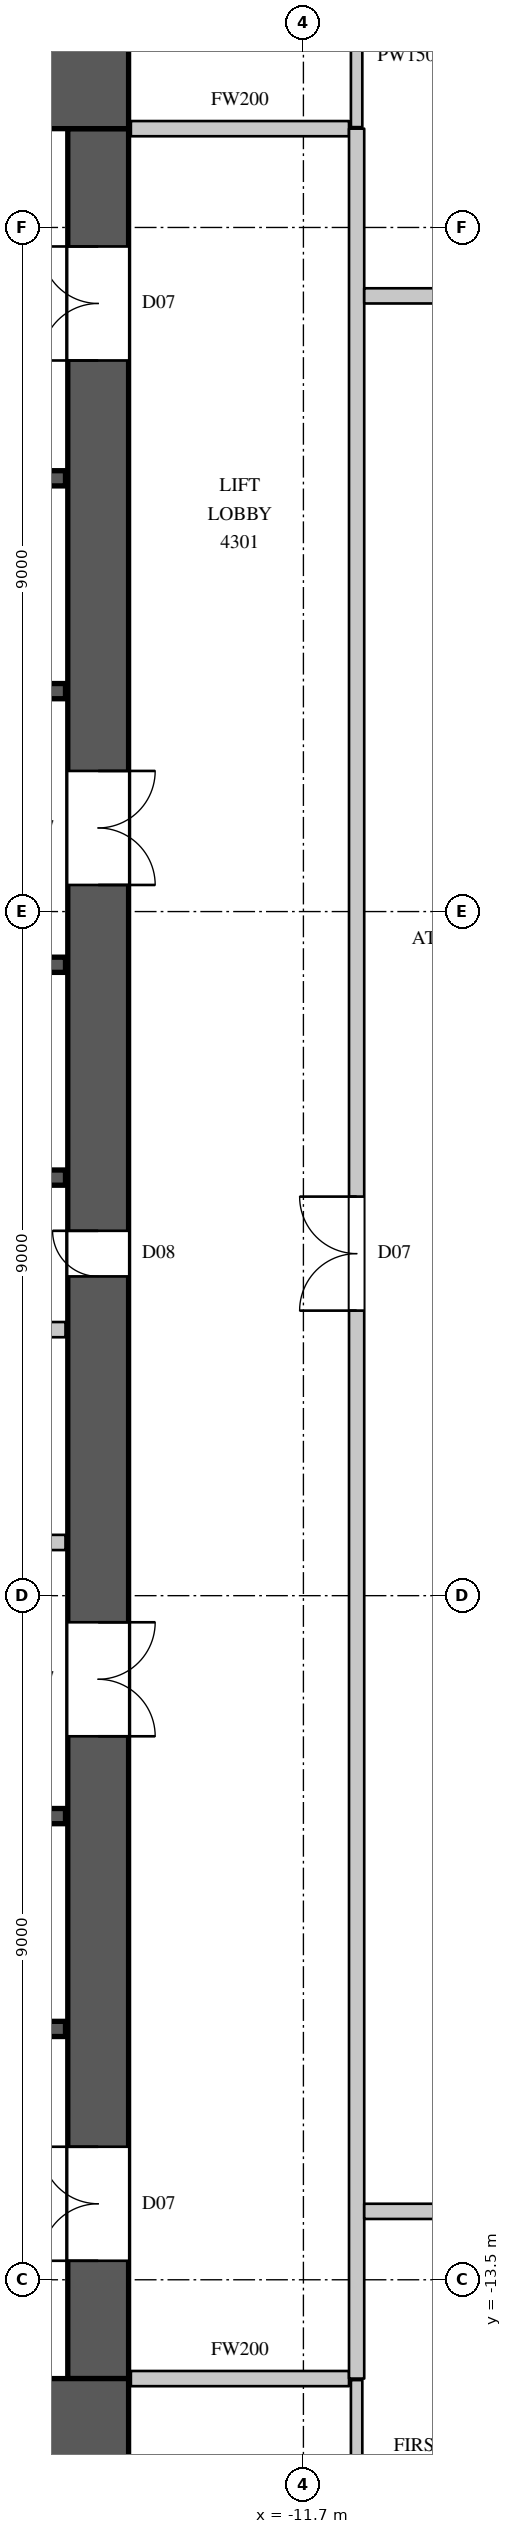
"""IFC4 building model, lengths in metres.
Left out: names, types, materials, properties, quantities, classifications, styles, units other than length and angle.
Written with IfcOpenShell. Run it as: python <this file> out.ifc"""

import sys

from ifc_helpers import new_model, si_unit, direction, frame, frame_2d, origin, place, context, subcontext, project, spatial, rectangle, extrude, element, fill, save


model = new_model("IFC4")
c1 = context("Model", 3, precision=1e-05, world=origin(), true_north=direction((0.0, 1.0)))
c2 = subcontext(c1, "Body", "Model", "MODEL_VIEW")
j1 = project(units=[si_unit("LENGTHUNIT", "METRE"), si_unit("PLANEANGLEUNIT", "RADIAN")], contexts=[c1])
p1 = place(None, origin())
s1 = spatial("IfcSite", under=j1, at=p1, CompositionType="ELEMENT")
p2 = place(p1, origin())
s2 = spatial("IfcBuilding", under=s1, at=p2, CompositionType="ELEMENT")
p3 = place(p2, frame((0.0, 0.0, 197.4)))
s3 = spatial("IfcBuildingStorey", under=s2, at=p3, CompositionType="ELEMENT", Elevation=197.4)
for number, where, z_axis, x_axis in (
    (1, (-30.0, 15.4, 0.0), (0.0, 0.0, 1.0), (1.0, 0.0, 0.0)),
    (2, (-30.0, -15.4, 0.0), (0.0, 0.0, 1.0), (1.0, 0.0, 0.0)),
):
    element("IfcWall", number, at=place(p3, frame(where, z_axis=z_axis, x_axis=x_axis)), inside=s3, PredefinedType="SHEAR", context=c2, shape_type="SweptSolid", body=[
        extrude(rectangle(XDim=16.0, YDim=1.2, at=frame_2d((8.0, 0.0))), origin(), (0.0, 0.0, 1.0), 4.1),
    ])
p4 = place(p3, frame((-14.4, -14.8, 0.0), z_axis=(0.0, 0.0, 1.0), x_axis=(0.0, 1.0, 0.0)))
e3 = element("IfcWall", 3, at=p4, inside=s3, PredefinedType="SHEAR", context=c2, shape_type="SweptSolid", body=[
    extrude(rectangle(XDim=29.6, YDim=0.8, at=frame_2d((14.8, 0.0))), origin(), (0.0, 0.0, 1.0), 4.1),
])
p5 = place(p4, frame((1.55, 0.0, 0.0)))
e4 = element("IfcOpeningElement", 4, at=p5, cuts=e3, PredefinedType="OPENING", context=c2, shape_type="SweptSolid", body=[
    extrude(rectangle(XDim=1.5, YDim=2.4, at=frame_2d((0.75, 1.2))), frame((0.0, 0.41, 0.0), z_axis=(0.0, -1.0, 0.0), x_axis=(1.0, 0.0, 0.0)), (0.0, 0.0, 1.0), 0.82),
])
p6 = place(p4, frame((26.55, 0.0, 0.0)))
e5 = element("IfcOpeningElement", 5, at=p6, cuts=e3, PredefinedType="OPENING", context=c2, shape_type="SweptSolid", body=[
    extrude(rectangle(XDim=1.5, YDim=2.4, at=frame_2d((0.75, 1.2))), frame((0.0, 0.41, 0.0), z_axis=(0.0, -1.0, 0.0), x_axis=(1.0, 0.0, 0.0)), (0.0, 0.0, 1.0), 0.82),
])
p7 = place(p4, frame((8.45, 0.0, 0.0)))
e6 = element("IfcOpeningElement", 6, at=p7, cuts=e3, PredefinedType="OPENING", context=c2, shape_type="SweptSolid", body=[
    extrude(rectangle(XDim=1.5, YDim=2.4, at=frame_2d((0.75, 1.2))), frame((0.0, 0.41, 0.0), z_axis=(0.0, -1.0, 0.0), x_axis=(1.0, 0.0, 0.0)), (0.0, 0.0, 1.0), 0.82),
])
p8 = place(p4, frame((19.65, 0.0, 0.0)))
e7 = element("IfcOpeningElement", 7, at=p8, cuts=e3, PredefinedType="OPENING", context=c2, shape_type="SweptSolid", body=[
    extrude(rectangle(XDim=1.5, YDim=2.4, at=frame_2d((0.75, 1.2))), frame((0.0, 0.41, 0.0), z_axis=(0.0, -1.0, 0.0), x_axis=(1.0, 0.0, 0.0)), (0.0, 0.0, 1.0), 0.82),
])
p9 = place(p4, frame((14.5, 0.0, 0.0)))
e8 = element("IfcOpeningElement", 8, at=p9, cuts=e3, PredefinedType="OPENING", context=c2, shape_type="SweptSolid", body=[
    extrude(rectangle(XDim=0.6, YDim=2.0, at=frame_2d((0.3, 1.0))), frame((0.0, 0.41, 0.0), z_axis=(0.0, -1.0, 0.0), x_axis=(1.0, 0.0, 0.0)), (0.0, 0.0, 1.0), 0.82),
])
p10 = place(p3, frame((-23.42, -3.8, 0.0), z_axis=(0.0, 0.0, 1.0), x_axis=(1.0, 0.0, 0.0)))
e9 = element("IfcWall", 9, at=p10, inside=s3, PredefinedType="PARTITIONING", context=c2, shape_type="SweptSolid", body=[
    extrude(rectangle(XDim=8.59, YDim=0.2, at=frame_2d((4.295, 0.0))), origin(), (0.0, 0.0, 1.0), 3.8),
])
p11 = place(p10, frame((2.0, 0.0, 0.0)))
e10 = element("IfcOpeningElement", 10, at=p11, cuts=e9, PredefinedType="OPENING", context=c2, shape_type="SweptSolid", body=[
    extrude(rectangle(XDim=0.9, YDim=2.2, at=frame_2d((0.45, 1.1))), frame((0.0, 0.11, 0.0), z_axis=(0.0, -1.0, 0.0), x_axis=(1.0, 0.0, 0.0)), (0.0, 0.0, 1.0), 0.22),
])
p12 = place(p10, frame((6.15, 0.0, 0.0)))
e11 = element("IfcOpeningElement", 11, at=p12, cuts=e9, PredefinedType="OPENING", context=c2, shape_type="SweptSolid", body=[
    extrude(rectangle(XDim=0.9, YDim=2.2, at=frame_2d((0.45, 1.1))), frame((0.0, 0.11, 0.0), z_axis=(0.0, -1.0, 0.0), x_axis=(1.0, 0.0, 0.0)), (0.0, 0.0, 1.0), 0.22),
])
for number, where, z_axis, x_axis in (
    (12, (-13.97, -14.8, 0.0), (0.0, 0.0, 1.0), (1.0, 0.0, 0.0)),
    (13, (-13.97, 14.8, 0.0), (0.0, 0.0, 1.0), (1.0, 0.0, 0.0)),
):
    element("IfcWall", number, at=place(p3, frame(where, z_axis=z_axis, x_axis=x_axis)), inside=s3, PredefinedType="PARTITIONING", context=c2, shape_type="SweptSolid", body=[
        extrude(rectangle(XDim=2.87, YDim=0.2, at=frame_2d((1.435, 0.0))), origin(), (0.0, 0.0, 1.0), 3.8),
    ])
p13 = place(p3, frame((-11.0, -14.8, 0.0), z_axis=(0.0, 0.0, 1.0), x_axis=(0.0, 1.0, 0.0)))
e14 = element("IfcWall", 14, at=p13, inside=s3, PredefinedType="PARTITIONING", context=c2, shape_type="SweptSolid", body=[
    extrude(rectangle(XDim=29.6, YDim=0.2, at=frame_2d((14.8, 0.0))), origin(), (0.0, 0.0, 1.0), 3.8),
])
p14 = place(p13, frame((14.05, 0.0, 0.0)))
e15 = element("IfcOpeningElement", 15, at=p14, cuts=e14, PredefinedType="OPENING", context=c2, shape_type="SweptSolid", body=[
    extrude(rectangle(XDim=1.5, YDim=2.4, at=frame_2d((0.75, 1.2))), frame((0.0, 0.11, 0.0), z_axis=(0.0, -1.0, 0.0), x_axis=(1.0, 0.0, 0.0)), (0.0, 0.0, 1.0), 0.22),
])
p15 = place(p3, frame((-10.9, -12.6, 0.0), z_axis=(0.0, 0.0, 1.0), x_axis=(1.0, 0.0, 0.0)))
e16 = element("IfcWall", 16, at=p15, inside=s3, PredefinedType="PARTITIONING", context=c2, shape_type="SweptSolid", body=[
    extrude(rectangle(XDim=15.521, YDim=0.2, at=frame_2d((7.76, 0.0))), origin(), (0.0, 0.0, 1.0), 3.8),
])
p16 = place(p15, frame((0.95, 0.0, 0.0)))
e17 = element("IfcOpeningElement", 17, at=p16, cuts=e16, PredefinedType="OPENING", context=c2, shape_type="SweptSolid", body=[
    extrude(rectangle(XDim=0.9, YDim=2.2, at=frame_2d((0.45, 1.1))), frame((0.0, 0.11, 0.0), z_axis=(0.0, -1.0, 0.0), x_axis=(1.0, 0.0, 0.0)), (0.0, 0.0, 1.0), 0.22),
])
p17 = place(p15, frame((3.95, 0.0, 0.0)))
e18 = element("IfcOpeningElement", 18, at=p17, cuts=e16, PredefinedType="OPENING", context=c2, shape_type="SweptSolid", body=[
    extrude(rectangle(XDim=0.9, YDim=2.2, at=frame_2d((0.45, 1.1))), frame((0.0, 0.11, 0.0), z_axis=(0.0, -1.0, 0.0), x_axis=(1.0, 0.0, 0.0)), (0.0, 0.0, 1.0), 0.22),
])
p18 = place(p15, frame((7.1, 0.0, 0.0)))
e19 = element("IfcOpeningElement", 19, at=p18, cuts=e16, PredefinedType="OPENING", context=c2, shape_type="SweptSolid", body=[
    extrude(rectangle(XDim=0.9, YDim=2.2, at=frame_2d((0.45, 1.1))), frame((0.0, 0.11, 0.0), z_axis=(0.0, -1.0, 0.0), x_axis=(1.0, 0.0, 0.0)), (0.0, 0.0, 1.0), 0.22),
])
p19 = place(p15, frame((10.0, 0.0, 0.0)))
e20 = element("IfcOpeningElement", 20, at=p19, cuts=e16, PredefinedType="OPENING", context=c2, shape_type="SweptSolid", body=[
    extrude(rectangle(XDim=0.9, YDim=2.2, at=frame_2d((0.45, 1.1))), frame((0.0, 0.11, 0.0), z_axis=(0.0, -1.0, 0.0), x_axis=(1.0, 0.0, 0.0)), (0.0, 0.0, 1.0), 0.22),
])
p20 = place(p15, frame((13.5, 0.0, 0.0)))
e21 = element("IfcOpeningElement", 21, at=p20, cuts=e16, PredefinedType="OPENING", context=c2, shape_type="SweptSolid", body=[
    extrude(rectangle(XDim=0.9, YDim=2.2, at=frame_2d((0.45, 1.1))), frame((0.0, 0.11, 0.0), z_axis=(0.0, -1.0, 0.0), x_axis=(1.0, 0.0, 0.0)), (0.0, 0.0, 1.0), 0.22),
])
p21 = place(p3, frame((-10.9, 12.6, 0.0), z_axis=(0.0, 0.0, 1.0), x_axis=(1.0, 0.0, 0.0)))
e22 = element("IfcWall", 22, at=p21, inside=s3, PredefinedType="PARTITIONING", context=c2, shape_type="SweptSolid", body=[
    extrude(rectangle(XDim=3.935, YDim=0.2, at=frame_2d((1.968, 0.0))), origin(), (0.0, 0.0, 1.0), 3.8),
])
p22 = place(p21, frame((1.7, 0.0, 0.0)))
e23 = element("IfcOpeningElement", 23, at=p22, cuts=e22, PredefinedType="OPENING", context=c2, shape_type="SweptSolid", body=[
    extrude(rectangle(XDim=1.1, YDim=2.4, at=frame_2d((0.55, 1.2))), frame((0.0, 0.11, 0.0), z_axis=(0.0, -1.0, 0.0), x_axis=(1.0, 0.0, 0.0)), (0.0, 0.0, 1.0), 0.22),
])
for number, where, z_axis, x_axis in (
    (24, (-11.0, -16.7, 0.0), (0.0, 0.0, 1.0), (0.0, 1.0, 0.0)),
    (25, (-11.0, 14.82, 0.0), (0.0, 0.0, 1.0), (0.0, 1.0, 0.0)),
):
    element("IfcWall", number, at=place(p3, frame(where, z_axis=z_axis, x_axis=x_axis)), inside=s3, PredefinedType="PARTITIONING", context=c2, shape_type="SweptSolid", body=[
        extrude(rectangle(XDim=1.88, YDim=0.15, at=frame_2d((0.94, 0.0))), origin(), (0.0, 0.0, 1.0), 3.8),
    ])
p23 = place(p3, frame((-29.17, -1.0, 0.0), z_axis=(0.0, 0.0, 1.0), x_axis=(1.0, 0.0, 0.0)))
e26 = element("IfcWall", 26, at=p23, inside=s3, PredefinedType="PARTITIONING", context=c2, shape_type="SweptSolid", body=[
    extrude(rectangle(XDim=14.34, YDim=0.2, at=frame_2d((7.17, 0.0))), origin(), (0.0, 0.0, 1.0), 3.8),
])
p24 = place(p3, frame((-26.08, 1.0, 0.0), z_axis=(0.0, 0.0, 1.0), x_axis=(1.0, 0.0, 0.0)))
e27 = element("IfcWall", 27, at=p24, inside=s3, PredefinedType="SHEAR", context=c2, shape_type="SweptSolid", body=[
    extrude(rectangle(XDim=11.25, YDim=0.2, at=frame_2d((5.625, 0.0))), origin(), (0.0, 0.0, 1.0), 3.8),
])
p25 = place(p3, frame((-26.08, 3.8, 0.0), z_axis=(0.0, 0.0, 1.0), x_axis=(1.0, 0.0, 0.0)))
e28 = element("IfcWall", 28, at=p25, inside=s3, PredefinedType="SHEAR", context=c2, shape_type="SweptSolid", body=[
    extrude(rectangle(XDim=11.25, YDim=0.2, at=frame_2d((5.625, 0.0))), origin(), (0.0, 0.0, 1.0), 3.8),
])
p26 = place(p25, frame((0.8, 0.0, 0.0)))
e29 = element("IfcOpeningElement", 29, at=p26, cuts=e28, PredefinedType="OPENING", context=c2, shape_type="SweptSolid", body=[
    extrude(rectangle(XDim=1.1, YDim=2.2, at=frame_2d((0.55, 1.1))), frame((0.0, 0.11, 0.0), z_axis=(0.0, -1.0, 0.0), x_axis=(1.0, 0.0, 0.0)), (0.0, 0.0, 1.0), 0.22),
])
p27 = place(p25, frame((3.55, 0.0, 0.0)))
e30 = element("IfcOpeningElement", 30, at=p27, cuts=e28, PredefinedType="OPENING", context=c2, shape_type="SweptSolid", body=[
    extrude(rectangle(XDim=1.1, YDim=2.2, at=frame_2d((0.55, 1.1))), frame((0.0, 0.11, 0.0), z_axis=(0.0, -1.0, 0.0), x_axis=(1.0, 0.0, 0.0)), (0.0, 0.0, 1.0), 0.22),
])
p28 = place(p25, frame((6.25, 0.0, 0.0)))
e31 = element("IfcOpeningElement", 31, at=p28, cuts=e28, PredefinedType="OPENING", context=c2, shape_type="SweptSolid", body=[
    extrude(rectangle(XDim=1.1, YDim=2.2, at=frame_2d((0.55, 1.1))), frame((0.0, 0.11, 0.0), z_axis=(0.0, -1.0, 0.0), x_axis=(1.0, 0.0, 0.0)), (0.0, 0.0, 1.0), 0.22),
])
p29 = place(p25, frame((9.15, 0.0, 0.0)))
e32 = element("IfcOpeningElement", 32, at=p29, cuts=e28, PredefinedType="OPENING", context=c2, shape_type="SweptSolid", body=[
    extrude(rectangle(XDim=1.1, YDim=2.2, at=frame_2d((0.55, 1.1))), frame((0.0, 0.11, 0.0), z_axis=(0.0, -1.0, 0.0), x_axis=(1.0, 0.0, 0.0)), (0.0, 0.0, 1.0), 0.22),
])
p30 = place(p3, frame((-17.92, -10.2, 0.0), z_axis=(0.0, 0.0, 1.0), x_axis=(1.0, 0.0, 0.0)))
e33 = element("IfcWall", 33, at=p30, inside=s3, PredefinedType="SHEAR", context=c2, shape_type="SweptSolid", body=[
    extrude(rectangle(XDim=3.09, YDim=0.2, at=frame_2d((1.545, 0.0))), origin(), (0.0, 0.0, 1.0), 3.8),
])
p31 = place(p30, frame((1.0, 0.0, 0.0)))
e34 = element("IfcOpeningElement", 34, at=p31, cuts=e33, PredefinedType="OPENING", context=c2, shape_type="SweptSolid", body=[
    extrude(rectangle(XDim=1.1, YDim=2.2, at=frame_2d((0.55, 1.1))), frame((0.0, 0.11, 0.0), z_axis=(0.0, -1.0, 0.0), x_axis=(1.0, 0.0, 0.0)), (0.0, 0.0, 1.0), 0.22),
])
p32 = place(p3, frame((-17.9, -7.4, 0.0), z_axis=(0.0, 0.0, 1.0), x_axis=(1.0, 0.0, 0.0)))
e35 = element("IfcWall", 35, at=p32, inside=s3, PredefinedType="SHEAR", context=c2, shape_type="SweptSolid", body=[
    extrude(rectangle(XDim=3.07, YDim=0.2, at=frame_2d((1.535, 0.0))), origin(), (0.0, 0.0, 1.0), 3.8),
])
p33 = place(p3, frame((-17.92, 7.4, 0.0), z_axis=(0.0, 0.0, 1.0), x_axis=(1.0, 0.0, 0.0)))
e36 = element("IfcWall", 36, at=p33, inside=s3, PredefinedType="SHEAR", context=c2, shape_type="SweptSolid", body=[
    extrude(rectangle(XDim=3.09, YDim=0.2, at=frame_2d((1.545, 0.0))), origin(), (0.0, 0.0, 1.0), 3.8),
])
p34 = place(p3, frame((-17.92, 10.2, 0.0), z_axis=(0.0, 0.0, 1.0), x_axis=(1.0, 0.0, 0.0)))
e37 = element("IfcWall", 37, at=p34, inside=s3, PredefinedType="SHEAR", context=c2, shape_type="SweptSolid", body=[
    extrude(rectangle(XDim=3.09, YDim=0.2, at=frame_2d((1.545, 0.0))), origin(), (0.0, 0.0, 1.0), 3.8),
])
p35 = place(p34, frame((1.0, 0.0, 0.0)))
e38 = element("IfcOpeningElement", 38, at=p35, cuts=e37, PredefinedType="OPENING", context=c2, shape_type="SweptSolid", body=[
    extrude(rectangle(XDim=1.1, YDim=2.2, at=frame_2d((0.55, 1.1))), frame((0.0, 0.11, 0.0), z_axis=(0.0, -1.0, 0.0), x_axis=(1.0, 0.0, 0.0)), (0.0, 0.0, 1.0), 0.22),
])
p36 = place(p14, origin())
e39 = element("IfcDoor", 39, at=p36, inside=s3, OperationType="DOUBLE_DOOR_SINGLE_SWING", PredefinedType="DOOR", context=c2, shape_type="SweptSolid", body=[
    extrude(rectangle(XDim=1.5, YDim=2.4, at=frame_2d((0.75, 1.2))), frame((0.0, 0.025, 0.0), z_axis=(0.0, -1.0, 0.0), x_axis=(1.0, 0.0, 0.0)), (0.0, 0.0, 1.0), 0.05),
])
fill(e15, e39)
p37 = place(p5, origin())
e40 = element("IfcDoor", 40, at=p37, inside=s3, OperationType="DOUBLE_DOOR_SINGLE_SWING", PredefinedType="DOOR", context=c2, shape_type="SweptSolid", body=[
    extrude(rectangle(XDim=1.5, YDim=2.4, at=frame_2d((0.75, 1.2))), frame((0.0, 0.395, 0.0), z_axis=(0.0, -1.0, 0.0), x_axis=(1.0, 0.0, 0.0)), (0.0, 0.0, 1.0), 0.05),
])
fill(e4, e40)
p38 = place(p6, origin())
e41 = element("IfcDoor", 41, at=p38, inside=s3, OperationType="DOUBLE_DOOR_SINGLE_SWING", PredefinedType="DOOR", context=c2, shape_type="SweptSolid", body=[
    extrude(rectangle(XDim=1.5, YDim=2.4, at=frame_2d((0.75, 1.2))), frame((0.0, 0.395, 0.0), z_axis=(0.0, -1.0, 0.0), x_axis=(1.0, 0.0, 0.0)), (0.0, 0.0, 1.0), 0.05),
])
fill(e5, e41)
p39 = place(p7, origin())
e42 = element("IfcDoor", 42, at=p39, inside=s3, OperationType="DOUBLE_DOOR_SINGLE_SWING", PredefinedType="DOOR", context=c2, shape_type="SweptSolid", body=[
    extrude(rectangle(XDim=1.5, YDim=2.4, at=frame_2d((0.75, 1.2))), frame((0.0, -0.345, 0.0), z_axis=(0.0, -1.0, 0.0), x_axis=(1.0, 0.0, 0.0)), (0.0, 0.0, 1.0), 0.05),
])
fill(e6, e42)
p40 = place(p8, origin())
e43 = element("IfcDoor", 43, at=p40, inside=s3, OperationType="DOUBLE_DOOR_SINGLE_SWING", PredefinedType="DOOR", context=c2, shape_type="SweptSolid", body=[
    extrude(rectangle(XDim=1.5, YDim=2.4, at=frame_2d((0.75, 1.2))), frame((0.0, -0.345, 0.0), z_axis=(0.0, -1.0, 0.0), x_axis=(1.0, 0.0, 0.0)), (0.0, 0.0, 1.0), 0.05),
])
fill(e7, e43)
p41 = place(p9, origin())
e44 = element("IfcDoor", 44, at=p41, inside=s3, OperationType="SINGLE_SWING_RIGHT", PredefinedType="DOOR", context=c2, shape_type="SweptSolid", body=[
    extrude(rectangle(XDim=0.6, YDim=2.0, at=frame_2d((0.3, 1.0))), frame((0.0, 0.395, 0.0), z_axis=(0.0, -1.0, 0.0), x_axis=(1.0, 0.0, 0.0)), (0.0, 0.0, 1.0), 0.05),
])
fill(e8, e44)
save(model, sys.argv[1])
